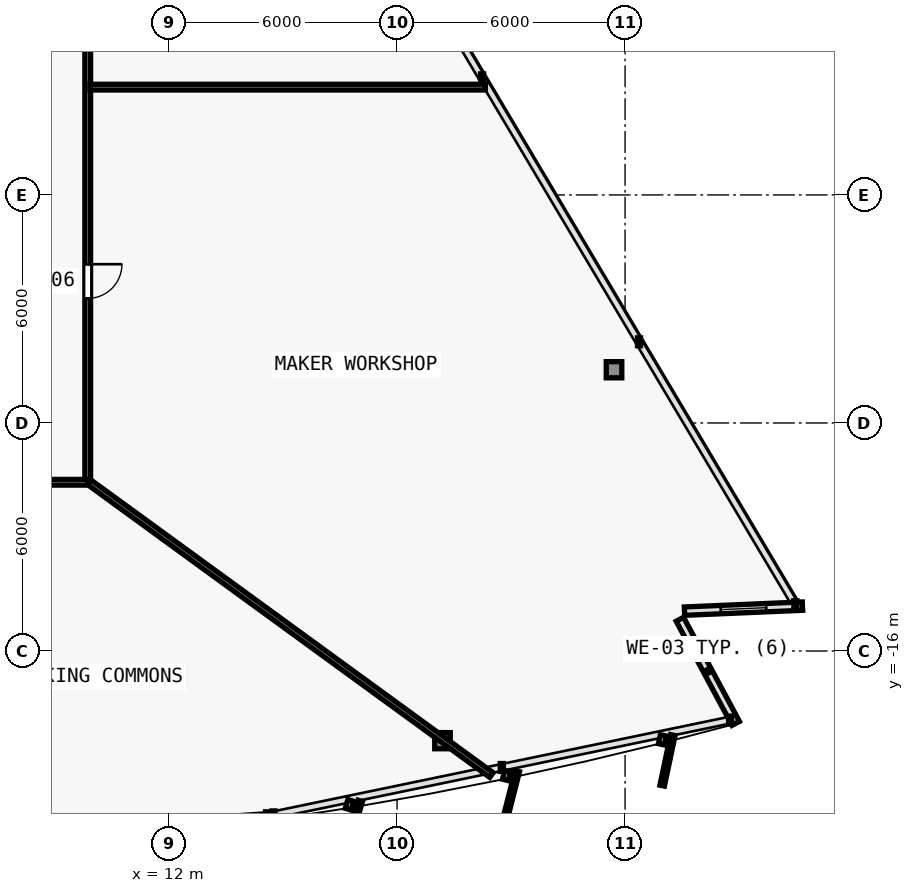
"""IFC4 building model, lengths in metres.
Left out: names, types, materials, properties, quantities, classifications, styles, units other than length and angle.
Written with IfcOpenShell. Run it as: python <this file> out.ifc"""

import sys

from ifc_helpers import new_model, si_unit, direction, frame, frame_2d, origin, origin_2d, place, context, subcontext, project, spatial, rectangle, i_section, extrude, element, fill, save


model = new_model("IFC4")
c1 = context("Model", 3, precision=1e-05, world=origin(), true_north=direction((0.0, 1.0)))
c2 = subcontext(c1, "Body", "Model", "MODEL_VIEW")
j1 = project(units=[si_unit("LENGTHUNIT", "METRE"), si_unit("PLANEANGLEUNIT", "RADIAN")], contexts=[c1])
p1 = place(None, origin())
s1 = spatial("IfcSite", under=j1, at=p1, CompositionType="ELEMENT")
p2 = place(p1, origin())
s2 = spatial("IfcBuilding", under=s1, at=p2, CompositionType="ELEMENT")
p3 = place(p2, frame((0.0, 0.0, 86.1)))
s3 = spatial("IfcBuildingStorey", under=s2, at=p3, CompositionType="ELEMENT", Elevation=86.1)
p4 = place(p3, frame((19.195, -18.36, 0.005), z_axis=(-0.020594893987, 0.033509183946, 0.999226193078), x_axis=(-0.851954850327, -0.523615252838, 0.0)))
e1 = element("IfcColumn", 1, at=p4, inside=s3, PredefinedType="COLUMN", context=c2, shape_type="SweptSolid", body=[
    extrude(i_section(OverallWidth=0.409, OverallDepth=0.425, WebThickness=0.021, FlangeThickness=0.034, FilletRadius=0.015, at=origin_2d()), origin(), (0.0, 0.0, 1.0), 3.592),
])
p5 = place(p3, frame((23.709, -8.599, 0.005), z_axis=(-0.026105663043, 0.021618752208, 0.999425396871), x_axis=(-0.637813971185, -0.770190455771, 0.0)))
e2 = element("IfcColumn", 2, at=p5, inside=s3, PredefinedType="COLUMN", context=c2, shape_type="SweptSolid", body=[
    extrude(i_section(OverallWidth=0.409, OverallDepth=0.425, WebThickness=0.021, FlangeThickness=0.034, FilletRadius=0.015, at=origin_2d()), origin(), (0.0, 0.0, 1.0), 3.591),
])
p6 = place(p3, frame((25.442, -15.165, 0.0), z_axis=(0.0, 0.0, 1.0), x_axis=(0.472811757317, -0.881163459378, 0.0)))
e3 = element("IfcWall", 3, at=p6, inside=s3, PredefinedType="SOLIDWALL", context=c2, shape_type="SweptSolid", body=[
    extrude(rectangle(XDim=3.11, YDim=0.22, at=frame_2d((1.555, 0.0))), origin(), (0.0, 0.0, 1.0), 3.35),
])
p7 = place(p3, frame((28.667, -14.819, 0.0), z_axis=(0.0, 0.0, 1.0), x_axis=(-0.99909228571, -0.042598176436, 0.0)))
e4 = element("IfcWall", 4, at=p7, inside=s3, PredefinedType="SOLIDWALL", context=c2, shape_type="SweptSolid", body=[
    extrude(rectangle(XDim=3.106, YDim=0.22, at=frame_2d((1.553, 0.0))), origin(), (0.0, 0.0, 1.0), 3.35),
])
p8 = place(p7, frame((0.953, 0.0, 0.62)))
e5 = element("IfcOpeningElement", 5, at=p8, cuts=e4, PredefinedType="OPENING", context=c2, shape_type="SweptSolid", body=[
    extrude(rectangle(XDim=1.2, YDim=1.8, at=frame_2d((0.6, 0.9))), frame((0.0, 0.12, 0.0), z_axis=(0.0, -1.0, 0.0), x_axis=(1.0, 0.0, 0.0)), (0.0, 0.0, 1.0), 0.24),
])
p9 = place(p3, frame((9.86, 8.426, 0.0), z_axis=(0.0, 0.0, 1.0), x_axis=(0.0, -1.0, 0.0)))
e6 = element("IfcWall", 6, at=p9, inside=s3, PredefinedType="PARTITIONING", context=c2, shape_type="SweptSolid", body=[
    extrude(rectangle(XDim=19.986, YDim=0.15, at=frame_2d((9.993, 0.0))), origin(), (0.0, 0.0, 1.0), 2.609),
])
p10 = place(p9, frame((14.248, 0.0, 0.0)))
e7 = element("IfcOpeningElement", 7, at=p10, cuts=e6, PredefinedType="OPENING", context=c2, shape_type="SweptSolid", body=[
    extrude(rectangle(XDim=0.9, YDim=2.1, at=frame_2d((0.45, 1.05))), frame((0.0, 0.085, 0.0), z_axis=(0.0, -1.0, 0.0), x_axis=(1.0, 0.0, 0.0)), (0.0, 0.0, 1.0), 0.17),
])
p11 = place(p9, frame((4.434, 0.0, 0.0)))
e8 = element("IfcOpeningElement", 8, at=p11, cuts=e6, PredefinedType="OPENING", context=c2, shape_type="SweptSolid", body=[
    extrude(rectangle(XDim=0.9, YDim=2.1, at=frame_2d((0.45, 1.05))), frame((0.0, 0.085, 0.0), z_axis=(0.0, -1.0, 0.0), x_axis=(1.0, 0.0, 0.0)), (0.0, 0.0, 1.0), 0.17),
])
p12 = place(p3, frame((9.86, -11.56, 0.0), z_axis=(0.0, 0.0, 1.0), x_axis=(-1.0, 0.0, 0.0)))
e9 = element("IfcWall", 9, at=p12, inside=s3, PredefinedType="PARTITIONING", context=c2, shape_type="SweptSolid", body=[
    extrude(rectangle(XDim=6.78, YDim=0.15, at=frame_2d((3.39, 0.0))), origin(), (0.0, 0.0, 1.0), 2.725),
])
p13 = place(p12, frame((2.94, 0.0, 0.0)))
e10 = element("IfcOpeningElement", 10, at=p13, cuts=e9, PredefinedType="OPENING", context=c2, shape_type="SweptSolid", body=[
    extrude(rectangle(XDim=0.9, YDim=2.1, at=frame_2d((0.45, 1.05))), frame((0.0, 0.085, 0.0), z_axis=(0.0, -1.0, 0.0), x_axis=(1.0, 0.0, 0.0)), (0.0, 0.0, 1.0), 0.17),
])
p14 = place(p3, frame((9.896, -11.558, 0.0), z_axis=(0.0, 0.0, 1.0), x_axis=(0.808494137529, -0.588504230726, 0.0)))
e11 = element("IfcWall", 11, at=p14, inside=s3, PredefinedType="PARTITIONING", context=c2, shape_type="SweptSolid", body=[
    extrude(rectangle(XDim=13.094, YDim=0.15, at=frame_2d((6.547, 0.0))), origin(), (0.0, 0.0, 1.0), 2.725),
])
p15 = place(p3, frame((9.92, -1.163, 0.0), z_axis=(0.0, 0.0, 1.0), x_axis=(1.0, 0.0, 0.0)))
e12 = element("IfcWall", 12, at=p15, inside=s3, PredefinedType="PARTITIONING", context=c2, shape_type="SweptSolid", body=[
    extrude(rectangle(XDim=10.404, YDim=0.15, at=frame_2d((5.202, 0.0))), origin(), (0.0, 0.0, 1.0), 2.775),
])
p16 = place(p8, origin())
e13 = element("IfcWindow", 13, at=p16, inside=s3, PartitioningType="SINGLE_PANEL", PredefinedType="WINDOW", context=c2, shape_type="SweptSolid", body=[
    extrude(rectangle(XDim=1.2, YDim=1.8, at=frame_2d((0.6, 0.9))), frame((0.0, 0.03, 0.0), z_axis=(0.0, -1.0, 0.0), x_axis=(1.0, 0.0, 0.0)), (0.0, 0.0, 1.0), 0.06),
])
fill(e5, e13)
p17 = place(p10, origin())
e14 = element("IfcDoor", 14, at=p17, inside=s3, OperationType="SINGLE_SWING_LEFT", PredefinedType="DOOR", context=c2, shape_type="SweptSolid", body=[
    extrude(rectangle(XDim=0.9, YDim=2.1, at=frame_2d((0.45, 1.05))), frame((0.0, 0.025, 0.0), z_axis=(0.0, -1.0, 0.0), x_axis=(1.0, 0.0, 0.0)), (0.0, 0.0, 1.0), 0.05),
])
fill(e7, e14)
save(model, sys.argv[1])
